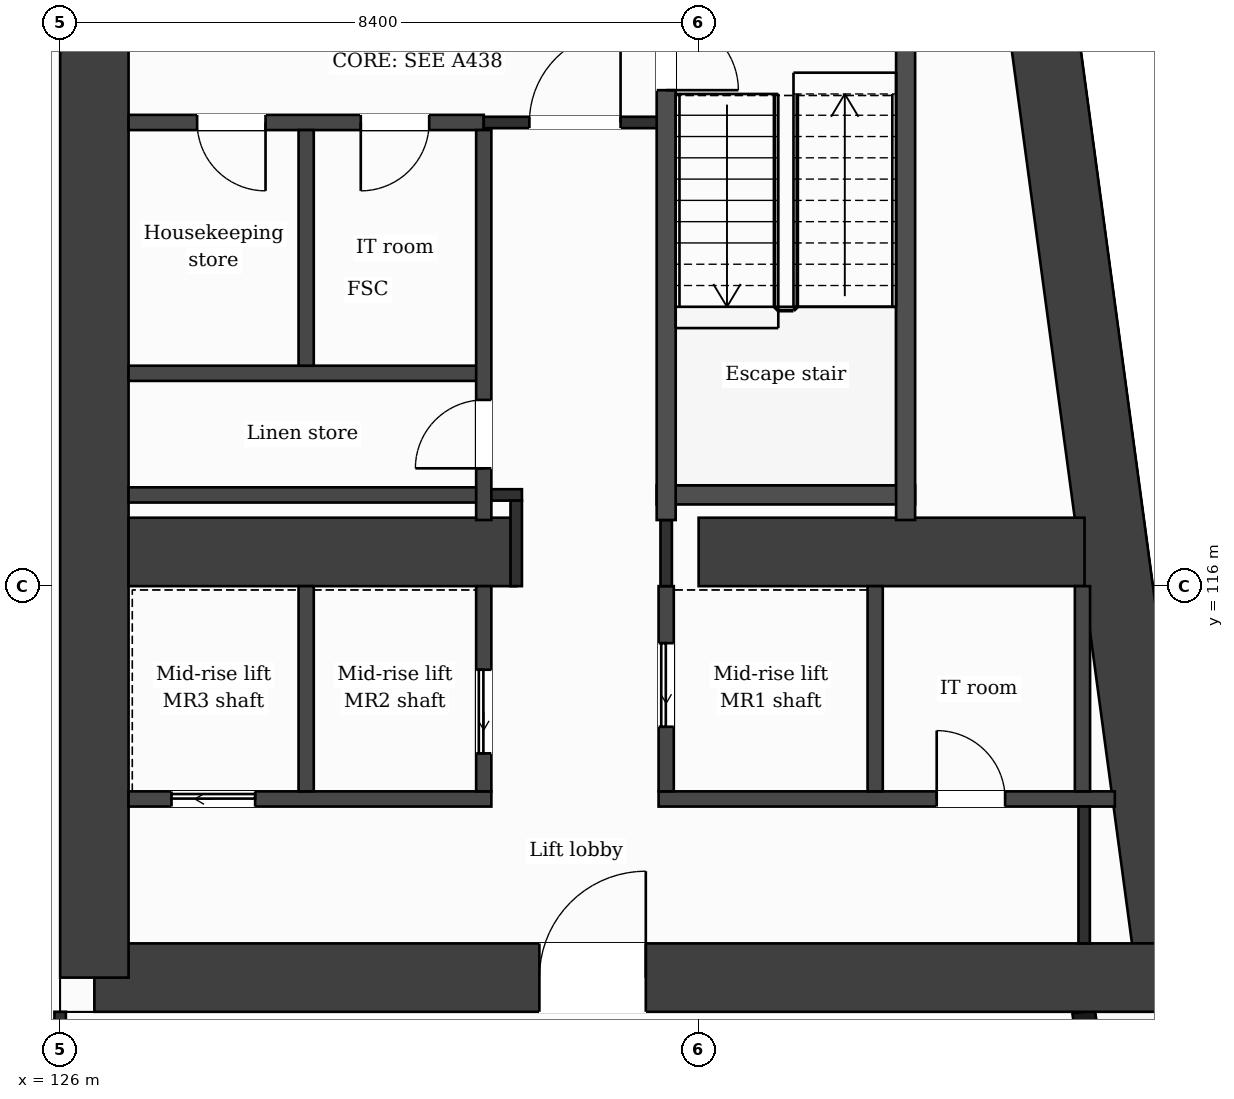
"""IFC4 building model, lengths in metres.
Left out: names, types, materials, properties, quantities, classifications, styles, units other than length and angle.
Written with IfcOpenShell. Run it as: python <this file> out.ifc"""

import sys

from ifc_helpers import new_model, si_unit, direction, frame, frame_2d, origin, place, context, subcontext, project, spatial, rectangle, extrude, element, fill, save


model = new_model("IFC4")
c1 = context("Model", 3, precision=1e-05, world=origin(), true_north=direction((0.0, 1.0)))
c2 = subcontext(c1, "Body", "Model", "MODEL_VIEW")
j1 = project(units=[si_unit("LENGTHUNIT", "METRE"), si_unit("PLANEANGLEUNIT", "RADIAN")], contexts=[c1])
p1 = place(None, origin())
s1 = spatial("IfcSite", under=j1, at=p1, CompositionType="ELEMENT")
p2 = place(p1, origin())
s2 = spatial("IfcBuilding", under=s1, at=p2, CompositionType="ELEMENT")
p3 = place(p2, frame((0.0, 0.0, 158.9)))
s3 = spatial("IfcBuildingStorey", under=s2, at=p3, CompositionType="ELEMENT", Elevation=158.9)
p4 = place(p3, frame((137.776, 131.95, 0.0), z_axis=(0.0, 0.0, 1.0), x_axis=(0.133421759112, -0.991059349482, 0.0)))
e1 = element("IfcWall", 1, at=p4, inside=s3, PredefinedType="SHEAR", context=c2, shape_type="SweptSolid", body=[
    extrude(rectangle(XDim=21.29, YDim=0.9, at=frame_2d((10.645, 0.0))), origin(), (0.0, 0.0, 1.0), 3.7),
])
p5 = place(p3, frame((140.616, 110.85, 0.0), z_axis=(0.0, 0.0, 1.0), x_axis=(-1.0, 0.0, 0.0)))
e2 = element("IfcWall", 2, at=p5, inside=s3, PredefinedType="SHEAR", context=c2, shape_type="SweptSolid", body=[
    extrude(rectangle(XDim=14.166, YDim=0.9, at=frame_2d((7.083, 0.0))), origin(), (0.0, 0.0, 1.0), 3.7),
])
p6 = place(p5, frame((6.911, 0.0, 0.0)))
e3 = element("IfcOpeningElement", 3, at=p6, cuts=e2, PredefinedType="OPENING", context=c2, shape_type="SweptSolid", body=[
    extrude(rectangle(XDim=1.4, YDim=2.1, at=frame_2d((0.7, 1.05))), frame((0.0, 0.46, 0.0), z_axis=(0.0, -1.0, 0.0), x_axis=(1.0, 0.0, 0.0)), (0.0, 0.0, 1.0), 0.92),
])
p7 = place(p3, frame((126.45, 110.85, 0.0), z_axis=(0.0, 0.0, 1.0), x_axis=(0.0, 1.0, 0.0)))
e4 = element("IfcWall", 4, at=p7, inside=s3, PredefinedType="SHEAR", context=c2, shape_type="SweptSolid", body=[
    extrude(rectangle(XDim=21.1, YDim=0.9, at=frame_2d((10.55, 0.0))), origin(), (0.0, 0.0, 1.0), 3.7),
])
p8 = place(p3, frame((126.9, 116.45, 0.0), z_axis=(0.0, 0.0, 1.0), x_axis=(1.0, 0.0, 0.0)))
e5 = element("IfcWall", 5, at=p8, inside=s3, PredefinedType="SHEAR", context=c2, shape_type="SweptSolid", body=[
    extrude(rectangle(XDim=5.1, YDim=0.9, at=frame_2d((2.55, 0.0))), origin(), (0.0, 0.0, 1.0), 3.7),
])
p9 = place(p3, frame((134.4, 116.45, 0.0), z_axis=(0.0, 0.0, 1.0), x_axis=(1.0, 0.0, 0.0)))
e6 = element("IfcWall", 6, at=p9, inside=s3, PredefinedType="SHEAR", context=c2, shape_type="SweptSolid", body=[
    extrude(rectangle(XDim=5.077, YDim=0.9, at=frame_2d((2.539, 0.0))), origin(), (0.0, 0.0, 1.0), 3.7),
])
p10 = place(p3, frame((140.348, 103.85, 0.0), z_axis=(0.0, 0.0, 1.0), x_axis=(-0.133431549479, 0.991058031401, 0.0)))
e7 = element("IfcWall", 7, at=p10, inside=s3, PredefinedType="SOLIDWALL", context=c2, shape_type="SweptSolid", body=[
    extrude(rectangle(XDim=6.609, YDim=0.3, at=frame_2d((3.304, 0.0))), origin(), (0.0, 0.0, 1.0), 3.38),
])
p11 = place(p10, frame((0.737, 0.0, 0.9)))
e8 = element("IfcOpeningElement", 8, at=p11, cuts=e7, PredefinedType="OPENING", context=c2, shape_type="SweptSolid", body=[
    extrude(rectangle(XDim=1.2, YDim=2.1, at=frame_2d((0.6, 1.05))), frame((0.0, 0.16, 0.0), z_axis=(0.0, -1.0, 0.0), x_axis=(1.0, 0.0, 0.0)), (0.0, 0.0, 1.0), 0.32),
])
p12 = place(p10, frame((3.991, 0.0, 0.0)))
e9 = element("IfcOpeningElement", 9, at=p12, cuts=e7, PredefinedType="OPENING", context=c2, shape_type="SweptSolid", body=[
    extrude(rectangle(XDim=1.2, YDim=2.4, at=frame_2d((0.6, 1.2))), frame((0.0, 0.16, 0.0), z_axis=(0.0, -1.0, 0.0), x_axis=(1.0, 0.0, 0.0)), (0.0, 0.0, 1.0), 0.32),
])
p13 = place(p3, frame((126.9, 113.2, 0.0), z_axis=(0.0, 0.0, 1.0), x_axis=(1.0, 0.0, 0.0)))
e10 = element("IfcWall", 10, at=p13, inside=s3, PredefinedType="PARTITIONING", context=c2, shape_type="SweptSolid", body=[
    extrude(rectangle(XDim=4.773, YDim=0.2, at=frame_2d((2.387, 0.0))), origin(), (0.0, 0.0, 1.0), 3.38),
])
p14 = place(p13, frame((0.565, 0.0, 0.0)))
e11 = element("IfcOpeningElement", 11, at=p14, cuts=e10, PredefinedType="OPENING", context=c2, shape_type="SweptSolid", body=[
    extrude(rectangle(XDim=1.1, YDim=2.1, at=frame_2d((0.55, 1.05))), frame((0.0, 0.11, 0.0), z_axis=(0.0, -1.0, 0.0), x_axis=(1.0, 0.0, 0.0)), (0.0, 0.0, 1.0), 0.22),
])
p15 = place(p3, frame((133.873, 113.2, 0.0), z_axis=(0.0, 0.0, 1.0), x_axis=(1.0, 0.0, 0.0)))
e12 = element("IfcWall", 12, at=p15, inside=s3, PredefinedType="PARTITIONING", context=c2, shape_type="SweptSolid", body=[
    extrude(rectangle(XDim=6.003, YDim=0.2, at=frame_2d((3.001, 0.0))), origin(), (0.0, 0.0, 1.0), 3.38),
])
p16 = place(p15, frame((3.659, 0.0, 0.0)))
e13 = element("IfcOpeningElement", 13, at=p16, cuts=e12, PredefinedType="OPENING", context=c2, shape_type="SweptSolid", body=[
    extrude(rectangle(XDim=0.9, YDim=2.1, at=frame_2d((0.45, 1.05))), frame((0.0, 0.11, 0.0), z_axis=(0.0, -1.0, 0.0), x_axis=(1.0, 0.0, 0.0)), (0.0, 0.0, 1.0), 0.22),
])
p17 = place(p3, frame((126.9, 117.2, 0.0), z_axis=(0.0, 0.0, 1.0), x_axis=(1.0, 0.0, 0.0)))
e14 = element("IfcWall", 14, at=p17, inside=s3, PredefinedType="PARTITIONING", context=c2, shape_type="SweptSolid", body=[
    extrude(rectangle(XDim=4.673, YDim=0.2, at=frame_2d((2.336, 0.0))), origin(), (0.0, 0.0, 1.0), 3.38),
])
p18 = place(p3, frame((131.573, 117.2, 0.0), z_axis=(0.0, 0.0, 1.0), x_axis=(1.0, 0.0, 0.0)))
e15 = element("IfcWall", 15, at=p18, inside=s3, PredefinedType="PARTITIONING", context=c2, shape_type="SweptSolid", body=[
    extrude(rectangle(XDim=0.502, YDim=0.15, at=frame_2d((0.251, 0.0))), origin(), (0.0, 0.0, 1.0), 3.38),
])
p19 = place(p3, frame((133.848, 117.2, 0.0), z_axis=(0.0, 0.0, 1.0), x_axis=(1.0, 0.0, 0.0)))
e16 = element("IfcWall", 16, at=p19, inside=s3, PredefinedType="PARTITIONING", context=c2, shape_type="SweptSolid", body=[
    extrude(rectangle(XDim=3.4, YDim=0.25, at=frame_2d((1.7, 0.0))), origin(), (0.0, 0.0, 1.0), 3.38),
])
p20 = place(p3, frame((126.9, 118.8, 0.0), z_axis=(0.0, 0.0, 1.0), x_axis=(1.0, 0.0, 0.0)))
e17 = element("IfcWall", 17, at=p20, inside=s3, PredefinedType="PARTITIONING", context=c2, shape_type="SweptSolid", body=[
    extrude(rectangle(XDim=4.673, YDim=0.2, at=frame_2d((2.336, 0.0))), origin(), (0.0, 0.0, 1.0), 3.38),
])
p21 = place(p3, frame((126.9, 122.1, 0.0), z_axis=(0.0, 0.0, 1.0), x_axis=(1.0, 0.0, 0.0)))
e18 = element("IfcWall", 18, at=p21, inside=s3, PredefinedType="PARTITIONING", context=c2, shape_type="SweptSolid", body=[
    extrude(rectangle(XDim=4.673, YDim=0.2, at=frame_2d((2.336, 0.0))), origin(), (0.0, 0.0, 1.0), 3.38),
])
p22 = place(p21, frame((3.055, 0.0, 0.0)))
e19 = element("IfcOpeningElement", 19, at=p22, cuts=e18, PredefinedType="OPENING", context=c2, shape_type="SweptSolid", body=[
    extrude(rectangle(XDim=0.9, YDim=2.1, at=frame_2d((0.45, 1.05))), frame((0.0, 0.11, 0.0), z_axis=(0.0, -1.0, 0.0), x_axis=(1.0, 0.0, 0.0)), (0.0, 0.0, 1.0), 0.22),
])
p23 = place(p21, frame((0.902, 0.0, 0.0)))
e20 = element("IfcOpeningElement", 20, at=p23, cuts=e18, PredefinedType="OPENING", context=c2, shape_type="SweptSolid", body=[
    extrude(rectangle(XDim=0.9, YDim=2.1, at=frame_2d((0.45, 1.05))), frame((0.0, 0.11, 0.0), z_axis=(0.0, -1.0, 0.0), x_axis=(1.0, 0.0, 0.0)), (0.0, 0.0, 1.0), 0.22),
])
p24 = place(p3, frame((131.573, 122.1, 0.0), z_axis=(0.0, 0.0, 1.0), x_axis=(1.0, 0.0, 0.0)))
e21 = element("IfcWall", 21, at=p24, inside=s3, PredefinedType="PARTITIONING", context=c2, shape_type="SweptSolid", body=[
    extrude(rectangle(XDim=2.4, YDim=0.15, at=frame_2d((1.2, 0.0))), origin(), (0.0, 0.0, 1.0), 3.38),
])
p25 = place(p24, frame((0.6, 0.0, 0.0)))
e22 = element("IfcOpeningElement", 22, at=p25, cuts=e21, PredefinedType="OPENING", context=c2, shape_type="SweptSolid", body=[
    extrude(rectangle(XDim=1.2, YDim=2.1, at=frame_2d((0.6, 1.05))), frame((0.0, 0.085, 0.0), z_axis=(0.0, -1.0, 0.0), x_axis=(1.0, 0.0, 0.0)), (0.0, 0.0, 1.0), 0.17),
])
p26 = place(p3, frame((126.0, 109.075, 0.0), z_axis=(0.0, 0.0, 1.0), x_axis=(0.0, 1.0, 0.0)))
e23 = element("IfcWall", 23, at=p26, inside=s3, PredefinedType="PARTITIONING", context=c2, shape_type="SweptSolid", body=[
    extrude(rectangle(XDim=1.325, YDim=0.15, at=frame_2d((0.663, 0.0))), origin(), (0.0, 0.0, 1.0), 3.38),
])
p27 = place(p3, frame((129.237, 113.3, 0.0), z_axis=(0.0, 0.0, 1.0), x_axis=(0.0, 1.0, 0.0)))
e24 = element("IfcWall", 24, at=p27, inside=s3, PredefinedType="PARTITIONING", context=c2, shape_type="SweptSolid", body=[
    extrude(rectangle(XDim=2.7, YDim=0.2, at=frame_2d((1.35, 0.0))), origin(), (0.0, 0.0, 1.0), 3.38),
])
p28 = place(p3, frame((129.237, 118.9, 0.0), z_axis=(0.0, 0.0, 1.0), x_axis=(0.0, 1.0, 0.0)))
e25 = element("IfcWall", 25, at=p28, inside=s3, PredefinedType="PARTITIONING", context=c2, shape_type="SweptSolid", body=[
    extrude(rectangle(XDim=3.1, YDim=0.2, at=frame_2d((1.55, 0.0))), origin(), (0.0, 0.0, 1.0), 3.38),
])
p29 = place(p3, frame((131.573, 113.3, 0.0), z_axis=(0.0, 0.0, 1.0), x_axis=(0.0, 1.0, 0.0)))
e26 = element("IfcWall", 26, at=p29, inside=s3, PredefinedType="PARTITIONING", context=c2, shape_type="SweptSolid", body=[
    extrude(rectangle(XDim=2.7, YDim=0.2, at=frame_2d((1.35, 0.0))), origin(), (0.0, 0.0, 1.0), 3.38),
])
p30 = place(p29, frame((0.5, 0.0, 0.0)))
e27 = element("IfcOpeningElement", 27, at=p30, cuts=e26, PredefinedType="OPENING", context=c2, shape_type="SweptSolid", body=[
    extrude(rectangle(XDim=1.1, YDim=2.1, at=frame_2d((0.55, 1.05))), frame((0.0, 0.11, 0.0), z_axis=(0.0, -1.0, 0.0), x_axis=(1.0, 0.0, 0.0)), (0.0, 0.0, 1.0), 0.22),
])
p31 = place(p3, frame((131.573, 116.87, 0.0), z_axis=(0.0, 0.0, 1.0), x_axis=(0.0, 1.0, 0.0)))
e28 = element("IfcWall", 28, at=p31, inside=s3, PredefinedType="PARTITIONING", context=c2, shape_type="SweptSolid", body=[
    extrude(rectangle(XDim=5.13, YDim=0.2, at=frame_2d((2.565, 0.0))), origin(), (0.0, 0.0, 1.0), 3.38),
])
p32 = place(p31, frame((0.68, 0.0, 0.0)))
e29 = element("IfcOpeningElement", 29, at=p32, cuts=e28, PredefinedType="OPENING", context=c2, shape_type="SweptSolid", body=[
    extrude(rectangle(XDim=0.9, YDim=2.1, at=frame_2d((0.45, 1.05))), frame((0.0, 0.11, 0.0), z_axis=(0.0, -1.0, 0.0), x_axis=(1.0, 0.0, 0.0)), (0.0, 0.0, 1.0), 0.22),
])
p33 = place(p3, frame((132.0, 116.0, 0.0), z_axis=(0.0, 0.0, 1.0), x_axis=(0.0, 1.0, 0.0)))
e30 = element("IfcWall", 30, at=p33, inside=s3, PredefinedType="PARTITIONING", context=c2, shape_type="SweptSolid", body=[
    extrude(rectangle(XDim=1.125, YDim=0.15, at=frame_2d((0.562, 0.0))), origin(), (0.0, 0.0, 1.0), 3.38),
])
p34 = place(p3, frame((133.973, 113.3, 0.0), z_axis=(0.0, 0.0, 1.0), x_axis=(0.0, 1.0, 0.0)))
e31 = element("IfcWall", 31, at=p34, inside=s3, PredefinedType="PARTITIONING", context=c2, shape_type="SweptSolid", body=[
    extrude(rectangle(XDim=2.7, YDim=0.2, at=frame_2d((1.35, 0.0))), origin(), (0.0, 0.0, 1.0), 3.38),
])
p35 = place(p34, frame((0.85, 0.0, 0.0)))
e32 = element("IfcOpeningElement", 32, at=p35, cuts=e31, PredefinedType="OPENING", context=c2, shape_type="SweptSolid", body=[
    extrude(rectangle(XDim=1.1, YDim=2.1, at=frame_2d((0.55, 1.05))), frame((0.0, 0.11, 0.0), z_axis=(0.0, -1.0, 0.0), x_axis=(1.0, 0.0, 0.0)), (0.0, 0.0, 1.0), 0.22),
])
p36 = place(p3, frame((133.973, 116.0, 0.0), z_axis=(0.0, 0.0, 1.0), x_axis=(0.0, 1.0, 0.0)))
e33 = element("IfcWall", 33, at=p36, inside=s3, PredefinedType="PARTITIONING", context=c2, shape_type="SweptSolid", body=[
    extrude(rectangle(XDim=0.87, YDim=0.15, at=frame_2d((0.435, 0.0))), origin(), (0.0, 0.0, 1.0), 3.38),
])
p37 = place(p3, frame((133.973, 116.87, 0.0), z_axis=(0.0, 0.0, 1.0), x_axis=(0.0, 1.0, 0.0)))
e34 = element("IfcWall", 34, at=p37, inside=s3, PredefinedType="PARTITIONING", context=c2, shape_type="SweptSolid", body=[
    extrude(rectangle(XDim=6.955, YDim=0.25, at=frame_2d((3.478, 0.0))), origin(), (0.0, 0.0, 1.0), 3.38),
])
p38 = place(p37, frame((5.655, 0.0, 0.0)))
e35 = element("IfcOpeningElement", 35, at=p38, cuts=e34, PredefinedType="OPENING", context=c2, shape_type="SweptSolid", body=[
    extrude(rectangle(XDim=0.95, YDim=2.1, at=frame_2d((0.475, 1.05))), frame((0.0, 0.135, 0.0), z_axis=(0.0, -1.0, 0.0), x_axis=(1.0, 0.0, 0.0)), (0.0, 0.0, 1.0), 0.27),
])
p39 = place(p3, frame((136.722, 113.3, 0.0), z_axis=(0.0, 0.0, 1.0), x_axis=(0.0, 1.0, 0.0)))
e36 = element("IfcWall", 36, at=p39, inside=s3, PredefinedType="PARTITIONING", context=c2, shape_type="SweptSolid", body=[
    extrude(rectangle(XDim=2.7, YDim=0.2, at=frame_2d((1.35, 0.0))), origin(), (0.0, 0.0, 1.0), 3.38),
])
p40 = place(p3, frame((137.123, 116.87, 0.0), z_axis=(0.0, 0.0, 1.0), x_axis=(0.0, 1.0, 0.0)))
e37 = element("IfcWall", 37, at=p40, inside=s3, PredefinedType="PARTITIONING", context=c2, shape_type="SweptSolid", body=[
    extrude(rectangle(XDim=6.955, YDim=0.25, at=frame_2d((3.478, 0.0))), origin(), (0.0, 0.0, 1.0), 3.38),
])
p41 = place(p3, frame((139.45, 113.3, 0.0), z_axis=(0.0, 0.0, 1.0), x_axis=(0.0, 1.0, 0.0)))
e38 = element("IfcWall", 38, at=p41, inside=s3, PredefinedType="PARTITIONING", context=c2, shape_type="SweptSolid", body=[
    extrude(rectangle(XDim=2.7, YDim=0.2, at=frame_2d((1.35, 0.0))), origin(), (0.0, 0.0, 1.0), 3.38),
])
p42 = place(p3, frame((139.472, 111.3, 0.0), z_axis=(0.0, 0.0, 1.0), x_axis=(0.0, 1.0, 0.0)))
e39 = element("IfcWall", 39, at=p42, inside=s3, PredefinedType="PARTITIONING", context=c2, shape_type="SweptSolid", body=[
    extrude(rectangle(XDim=1.8, YDim=0.15, at=frame_2d((0.9, 0.0))), origin(), (0.0, 0.0, 1.0), 3.38),
])
p43 = place(p25, origin())
e40 = element("IfcDoor", 40, at=p43, inside=s3, OperationType="SINGLE_SWING_RIGHT", PredefinedType="DOOR", context=c2, shape_type="SweptSolid", body=[
    extrude(rectangle(XDim=1.2, YDim=2.1, at=frame_2d((0.6, 1.05))), frame((0.0, 0.025, 0.0), z_axis=(0.0, -1.0, 0.0), x_axis=(1.0, 0.0, 0.0)), (0.0, 0.0, 1.0), 0.05),
])
fill(e22, e40)
p44 = place(p22, origin())
e41 = element("IfcDoor", 41, at=p44, inside=s3, OperationType="SINGLE_SWING_LEFT", PredefinedType="DOOR", context=c2, shape_type="SweptSolid", body=[
    extrude(rectangle(XDim=0.9, YDim=2.1, at=frame_2d((0.45, 1.05))), frame((0.0, 0.025, 0.0), z_axis=(0.0, -1.0, 0.0), x_axis=(1.0, 0.0, 0.0)), (0.0, 0.0, 1.0), 0.05),
])
fill(e19, e41)
p45 = place(p23, origin())
e42 = element("IfcDoor", 42, at=p45, inside=s3, OperationType="SINGLE_SWING_RIGHT", PredefinedType="DOOR", context=c2, shape_type="SweptSolid", body=[
    extrude(rectangle(XDim=0.9, YDim=2.1, at=frame_2d((0.45, 1.05))), frame((0.0, 0.025, 0.0), z_axis=(0.0, -1.0, 0.0), x_axis=(1.0, 0.0, 0.0)), (0.0, 0.0, 1.0), 0.05),
])
fill(e20, e42)
p46 = place(p38, origin())
e43 = element("IfcDoor", 43, at=p46, inside=s3, OperationType="SINGLE_SWING_LEFT", PredefinedType="DOOR", context=c2, shape_type="SweptSolid", body=[
    extrude(rectangle(XDim=0.95, YDim=2.1, at=frame_2d((0.475, 1.05))), frame((0.0, 0.025, 0.0), z_axis=(0.0, -1.0, 0.0), x_axis=(1.0, 0.0, 0.0)), (0.0, 0.0, 1.0), 0.05),
])
fill(e35, e43)
p47 = place(p32, origin())
e44 = element("IfcDoor", 44, at=p47, inside=s3, OperationType="SINGLE_SWING_LEFT", PredefinedType="DOOR", context=c2, shape_type="SweptSolid", body=[
    extrude(rectangle(XDim=0.9, YDim=2.1, at=frame_2d((0.45, 1.05))), frame((0.0, 0.025, 0.0), z_axis=(0.0, -1.0, 0.0), x_axis=(1.0, 0.0, 0.0)), (0.0, 0.0, 1.0), 0.05),
])
fill(e29, e44)
p48 = place(p35, origin())
e45 = element("IfcDoor", 45, at=p48, inside=s3, OperationType="SLIDING_TO_LEFT", PredefinedType="DOOR", context=c2, shape_type="SweptSolid", body=[
    extrude(rectangle(XDim=1.1, YDim=2.1, at=frame_2d((0.55, 1.05))), frame((0.0, 0.025, 0.0), z_axis=(0.0, -1.0, 0.0), x_axis=(1.0, 0.0, 0.0)), (0.0, 0.0, 1.0), 0.05),
])
fill(e32, e45)
p49 = place(p30, origin())
e46 = element("IfcDoor", 46, at=p49, inside=s3, OperationType="SLIDING_TO_LEFT", PredefinedType="DOOR", context=c2, shape_type="SweptSolid", body=[
    extrude(rectangle(XDim=1.1, YDim=2.1, at=frame_2d((0.55, 1.05))), frame((0.0, 0.025, 0.0), z_axis=(0.0, -1.0, 0.0), x_axis=(1.0, 0.0, 0.0)), (0.0, 0.0, 1.0), 0.05),
])
fill(e27, e46)
p50 = place(p14, origin())
e47 = element("IfcDoor", 47, at=p50, inside=s3, OperationType="SLIDING_TO_LEFT", PredefinedType="DOOR", context=c2, shape_type="SweptSolid", body=[
    extrude(rectangle(XDim=1.1, YDim=2.1, at=frame_2d((0.55, 1.05))), frame((0.0, 0.025, 0.0), z_axis=(0.0, -1.0, 0.0), x_axis=(1.0, 0.0, 0.0)), (0.0, 0.0, 1.0), 0.05),
])
fill(e11, e47)
p51 = place(p16, origin())
e48 = element("IfcDoor", 48, at=p51, inside=s3, OperationType="SINGLE_SWING_LEFT", PredefinedType="DOOR", context=c2, shape_type="SweptSolid", body=[
    extrude(rectangle(XDim=0.9, YDim=2.1, at=frame_2d((0.45, 1.05))), frame((0.0, 0.025, 0.0), z_axis=(0.0, -1.0, 0.0), x_axis=(1.0, 0.0, 0.0)), (0.0, 0.0, 1.0), 0.05),
])
fill(e13, e48)
p52 = place(p6, origin())
e49 = element("IfcDoor", 49, at=p52, inside=s3, OperationType="SINGLE_SWING_LEFT", PredefinedType="DOOR", context=c2, shape_type="SweptSolid", body=[
    extrude(rectangle(XDim=1.4, YDim=2.1, at=frame_2d((0.7, 1.05))), frame((0.0, 0.025, 0.0), z_axis=(0.0, -1.0, 0.0), x_axis=(1.0, 0.0, 0.0)), (0.0, 0.0, 1.0), 0.05),
])
fill(e3, e49)
save(model, sys.argv[1])
